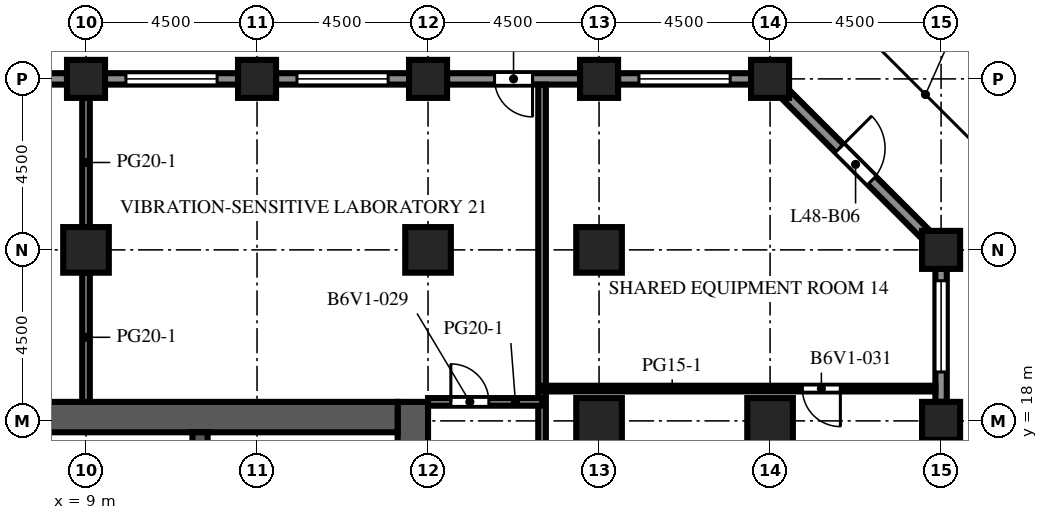
"""IFC4 building model, lengths in metres.
Left out: names, types, materials, properties, quantities, classifications, styles, units other than length and angle.
Written with IfcOpenShell. Run it as: python <this file> out.ifc"""

import sys

from ifc_helpers import new_model, si_unit, direction, frame, frame_2d, origin, origin_2d, place, context, subcontext, project, spatial, rectangle, extrude, element, fill, save


model = new_model("IFC4")
c1 = context("Model", 3, precision=1e-05, world=origin(), true_north=direction((0.0, 1.0)))
c2 = subcontext(c1, "Body", "Model", "MODEL_VIEW")
j1 = project(units=[si_unit("LENGTHUNIT", "METRE"), si_unit("PLANEANGLEUNIT", "RADIAN")], contexts=[c1])
p1 = place(None, origin())
s1 = spatial("IfcSite", under=j1, at=p1, CompositionType="ELEMENT")
p2 = place(p1, origin())
s2 = spatial("IfcBuilding", under=s1, at=p2, CompositionType="ELEMENT")
p3 = place(p2, frame((0.0, 0.0, 212.0)))
s3 = spatial("IfcBuildingStorey", under=s2, at=p3, CompositionType="ELEMENT", Elevation=212.0)
for number, where, z_axis, x_axis in (
    (1, (9.0, 27.0, 0.0), (0.0, 0.0, 1.0), (1.0, 0.0, 0.0)),
    (2, (13.5, 27.0, 0.0), (0.0, 0.0, 1.0), (1.0, 0.0, 0.0)),
    (3, (18.0, 27.0, 0.0), (0.0, 0.0, 1.0), (1.0, 0.0, 0.0)),
    (4, (22.5, 27.0, 0.0), (0.0, 0.0, 1.0), (1.0, 0.0, 0.0)),
    (5, (27.0, 27.0, 0.0), (0.0, 0.0, 1.0), (1.0, 0.0, 0.0)),
    (6, (31.5, 18.0, 0.0), (0.0, 0.0, 1.0), (1.0, 0.0, 0.0)),
    (7, (31.5, 22.5, 0.0), (0.0, 0.0, 1.0), (1.0, 0.0, 0.0)),
):
    element("IfcColumn", number, at=place(p3, frame(where, z_axis=z_axis, x_axis=x_axis)), inside=s3, PredefinedType="COLUMN", context=c2, shape_type="SweptSolid", body=[
        extrude(rectangle(XDim=1.0, YDim=1.0, at=origin_2d()), origin(), (0.0, 0.0, 1.0), 4.1),
    ])
for number, where, z_axis, x_axis in (
    (8, (9.0, 22.5, 0.0), (0.0, 0.0, 1.0), (1.0, 0.0, 0.0)),
    (9, (18.0, 22.5, 0.0), (0.0, 0.0, 1.0), (1.0, 0.0, 0.0)),
    (10, (22.5, 18.0, 0.0), (0.0, 0.0, 1.0), (1.0, 0.0, 0.0)),
    (11, (22.5, 22.5, 0.0), (0.0, 0.0, 1.0), (1.0, 0.0, 0.0)),
    (12, (27.0, 18.0, 0.0), (0.0, 0.0, 1.0), (1.0, 0.0, 0.0)),
):
    element("IfcColumn", number, at=place(p3, frame(where, z_axis=z_axis, x_axis=x_axis)), inside=s3, PredefinedType="COLUMN", context=c2, shape_type="SweptSolid", body=[
        extrude(rectangle(XDim=1.2, YDim=1.2, at=origin_2d()), origin(), (0.0, 0.0, 1.0), 4.1),
    ])
p4 = place(p3, frame((17.6, -9.0, 0.0), z_axis=(0.0, 0.0, 1.0), x_axis=(0.0, 1.0, 0.0)))
e13 = element("IfcWall", 13, at=p4, inside=s3, PredefinedType="SHEAR", context=c2, shape_type="SweptSolid", body=[
    extrude(rectangle(XDim=27.5, YDim=0.8, at=frame_2d((13.75, 0.0))), origin(), (0.0, 0.0, 1.0), 4.1),
])
p5 = place(p4, frame((12.55, 0.0, 0.0)))
e14 = element("IfcOpeningElement", 14, at=p5, cuts=e13, PredefinedType="OPENING", context=c2, shape_type="SweptSolid", body=[
    extrude(rectangle(XDim=2.4, YDim=2.4, at=frame_2d((1.2, 1.2))), frame((0.0, 0.41, 0.0), z_axis=(0.0, -1.0, 0.0), x_axis=(1.0, 0.0, 0.0)), (0.0, 0.0, 1.0), 0.82),
])
p6 = place(p4, frame((6.825, 0.0, 0.0)))
e15 = element("IfcOpeningElement", 15, at=p6, cuts=e13, PredefinedType="OPENING", context=c2, shape_type="SweptSolid", body=[
    extrude(rectangle(XDim=1.2, YDim=2.1, at=frame_2d((0.6, 1.05))), frame((0.0, 0.41, 0.0), z_axis=(0.0, -1.0, 0.0), x_axis=(1.0, 0.0, 0.0)), (0.0, 0.0, 1.0), 0.82),
])
p7 = place(p4, frame((19.475, 0.0, 0.0)))
e16 = element("IfcOpeningElement", 16, at=p7, cuts=e13, PredefinedType="OPENING", context=c2, shape_type="SweptSolid", body=[
    extrude(rectangle(XDim=1.2, YDim=2.1, at=frame_2d((0.6, 1.05))), frame((0.0, 0.41, 0.0), z_axis=(0.0, -1.0, 0.0), x_axis=(1.0, 0.0, 0.0)), (0.0, 0.0, 1.0), 0.82),
])
p8 = place(p3, frame((6.8, 18.1, 0.0), z_axis=(0.0, 0.0, 1.0), x_axis=(1.0, 0.0, 0.0)))
e17 = element("IfcWall", 17, at=p8, inside=s3, PredefinedType="SHEAR", context=c2, shape_type="SweptSolid", body=[
    extrude(rectangle(XDim=10.4, YDim=0.8, at=frame_2d((5.2, 0.0))), origin(), (0.0, 0.0, 1.0), 4.1),
])
p9 = place(p3, frame((12.0, 10.2, 0.0), z_axis=(0.0, 0.0, 1.0), x_axis=(0.0, 1.0, 0.0)))
e18 = element("IfcWall", 18, at=p9, inside=s3, PredefinedType="SHEAR", context=c2, shape_type="SweptSolid", body=[
    extrude(rectangle(XDim=7.5, YDim=0.4, at=frame_2d((3.75, 0.0))), origin(), (0.0, 0.0, 1.0), 4.1),
])
p10 = place(p3, frame((31.5, 22.0, 0.0), z_axis=(0.0, 0.0, 1.0), x_axis=(0.0, -1.0, 0.0)))
e19 = element("IfcWall", 19, at=p10, inside=s3, PredefinedType="SOLIDWALL", context=c2, shape_type="SweptSolid", body=[
    extrude(rectangle(XDim=3.5, YDim=0.3, at=frame_2d((1.75, 0.0))), origin(), (0.0, 0.0, 1.0), 2.85),
])
p11 = place(p10, frame((0.312, 0.0, 0.8)))
e20 = element("IfcOpeningElement", 20, at=p11, cuts=e19, PredefinedType="OPENING", context=c2, shape_type="SweptSolid", body=[
    extrude(rectangle(XDim=2.4, YDim=1.7, at=frame_2d((1.2, 0.85))), frame((0.0, 0.16, 0.0), z_axis=(0.0, -1.0, 0.0), x_axis=(1.0, 0.0, 0.0)), (0.0, 0.0, 1.0), 0.32),
])
p12 = place(p3, frame((27.394, 26.606, 0.0), z_axis=(0.0, 0.0, 1.0), x_axis=(0.707106781187, -0.707106781187, 0.0)))
e21 = element("IfcWall", 21, at=p12, inside=s3, PredefinedType="SOLIDWALL", context=c2, shape_type="SweptSolid", body=[
    extrude(rectangle(XDim=5.25, YDim=0.3, at=frame_2d((2.625, 0.0))), origin(), (0.0, 0.0, 1.0), 2.85),
])
p13 = place(p12, frame((2.025, 0.0, 0.0)))
e22 = element("IfcOpeningElement", 22, at=p13, cuts=e21, PredefinedType="OPENING", context=c2, shape_type="SweptSolid", body=[
    extrude(rectangle(XDim=1.2, YDim=2.2, at=frame_2d((0.6, 1.1))), frame((0.0, 0.16, 0.0), z_axis=(0.0, -1.0, 0.0), x_axis=(1.0, 0.0, 0.0)), (0.0, 0.0, 1.0), 0.32),
])
p14 = place(p3, frame((23.0, 27.0, 0.0), z_axis=(0.0, 0.0, 1.0), x_axis=(1.0, 0.0, 0.0)))
e23 = element("IfcWall", 23, at=p14, inside=s3, PredefinedType="SOLIDWALL", context=c2, shape_type="SweptSolid", body=[
    extrude(rectangle(XDim=3.5, YDim=0.3, at=frame_2d((1.75, 0.0))), origin(), (0.0, 0.0, 1.0), 2.85),
])
p15 = place(p14, frame((0.55, 0.0, 0.8)))
e24 = element("IfcOpeningElement", 24, at=p15, cuts=e23, PredefinedType="OPENING", context=c2, shape_type="SweptSolid", body=[
    extrude(rectangle(XDim=2.4, YDim=1.7, at=frame_2d((1.2, 0.85))), frame((0.0, 0.16, 0.0), z_axis=(0.0, -1.0, 0.0), x_axis=(1.0, 0.0, 0.0)), (0.0, 0.0, 1.0), 0.32),
])
p16 = place(p3, frame((18.5, 27.0, 0.0), z_axis=(0.0, 0.0, 1.0), x_axis=(1.0, 0.0, 0.0)))
e25 = element("IfcWall", 25, at=p16, inside=s3, PredefinedType="SOLIDWALL", context=c2, shape_type="SweptSolid", body=[
    extrude(rectangle(XDim=3.5, YDim=0.3, at=frame_2d((1.75, 0.0))), origin(), (0.0, 0.0, 1.0), 2.85),
])
p17 = place(p16, frame((1.25, 0.0, 0.0)))
e26 = element("IfcOpeningElement", 26, at=p17, cuts=e25, PredefinedType="OPENING", context=c2, shape_type="SweptSolid", body=[
    extrude(rectangle(XDim=1.0, YDim=2.2, at=frame_2d((0.5, 1.1))), frame((0.0, 0.16, 0.0), z_axis=(0.0, -1.0, 0.0), x_axis=(1.0, 0.0, 0.0)), (0.0, 0.0, 1.0), 0.32),
])
p18 = place(p3, frame((14.0, 27.0, 0.0), z_axis=(0.0, 0.0, 1.0), x_axis=(1.0, 0.0, 0.0)))
e27 = element("IfcWall", 27, at=p18, inside=s3, PredefinedType="SOLIDWALL", context=c2, shape_type="SweptSolid", body=[
    extrude(rectangle(XDim=3.5, YDim=0.3, at=frame_2d((1.75, 0.0))), origin(), (0.0, 0.0, 1.0), 2.85),
])
p19 = place(p18, frame((0.55, 0.0, 0.8)))
e28 = element("IfcOpeningElement", 28, at=p19, cuts=e27, PredefinedType="OPENING", context=c2, shape_type="SweptSolid", body=[
    extrude(rectangle(XDim=2.4, YDim=1.7, at=frame_2d((1.2, 0.85))), frame((0.0, 0.16, 0.0), z_axis=(0.0, -1.0, 0.0), x_axis=(1.0, 0.0, 0.0)), (0.0, 0.0, 1.0), 0.32),
])
p20 = place(p3, frame((9.5, 27.0, 0.0), z_axis=(0.0, 0.0, 1.0), x_axis=(1.0, 0.0, 0.0)))
e29 = element("IfcWall", 29, at=p20, inside=s3, PredefinedType="SOLIDWALL", context=c2, shape_type="SweptSolid", body=[
    extrude(rectangle(XDim=3.5, YDim=0.3, at=frame_2d((1.75, 0.0))), origin(), (0.0, 0.0, 1.0), 2.85),
])
p21 = place(p20, frame((0.55, 0.0, 0.8)))
e30 = element("IfcOpeningElement", 30, at=p21, cuts=e29, PredefinedType="OPENING", context=c2, shape_type="SweptSolid", body=[
    extrude(rectangle(XDim=2.4, YDim=1.7, at=frame_2d((1.2, 0.85))), frame((0.0, 0.16, 0.0), z_axis=(0.0, -1.0, 0.0), x_axis=(1.0, 0.0, 0.0)), (0.0, 0.0, 1.0), 0.32),
])
p22 = place(p3, frame((5.0, 27.0, 0.0), z_axis=(0.0, 0.0, 1.0), x_axis=(1.0, 0.0, 0.0)))
e31 = element("IfcWall", 31, at=p22, inside=s3, PredefinedType="SOLIDWALL", context=c2, shape_type="SweptSolid", body=[
    extrude(rectangle(XDim=3.5, YDim=0.3, at=frame_2d((1.75, 0.0))), origin(), (0.0, 0.0, 1.0), 2.85),
])
p23 = place(p22, frame((0.55, 0.0, 0.8)))
e32 = element("IfcOpeningElement", 32, at=p23, cuts=e31, PredefinedType="OPENING", context=c2, shape_type="SweptSolid", body=[
    extrude(rectangle(XDim=2.4, YDim=1.7, at=frame_2d((1.2, 0.85))), frame((0.0, 0.16, 0.0), z_axis=(0.0, -1.0, 0.0), x_axis=(1.0, 0.0, 0.0)), (0.0, 0.0, 1.0), 0.32),
])
p24 = place(p3, frame((8.2, 14.85, 0.0), z_axis=(0.0, 0.0, 1.0), x_axis=(0.0, 1.0, 0.0)))
e33 = element("IfcWall", 33, at=p24, inside=s3, PredefinedType="PARTITIONING", context=c2, shape_type="SweptSolid", body=[
    extrude(rectangle(XDim=2.85, YDim=0.1, at=frame_2d((1.425, 0.0))), origin(), (0.0, 0.0, 1.0), 3.65),
])
p25 = place(p24, frame((0.925, 0.0, 0.0)))
e34 = element("IfcOpeningElement", 34, at=p25, cuts=e33, PredefinedType="OPENING", context=c2, shape_type="SweptSolid", body=[
    extrude(rectangle(XDim=1.0, YDim=2.1, at=frame_2d((0.5, 1.05))), frame((0.0, 0.06, 0.0), z_axis=(0.0, -1.0, 0.0), x_axis=(1.0, 0.0, 0.0)), (0.0, 0.0, 1.0), 0.12),
])
for number, where, z_axis, x_axis in (
    (35, (9.0, 18.5, 0.0), (0.0, 0.0, 1.0), (0.0, 1.0, 0.0)),
    (36, (9.0, 23.1, 0.0), (0.0, 0.0, 1.0), (0.0, 1.0, 0.0)),
):
    element("IfcWall", number, at=place(p3, frame(where, z_axis=z_axis, x_axis=x_axis)), inside=s3, PredefinedType="PARTITIONING", context=c2, shape_type="SweptSolid", body=[
        extrude(rectangle(XDim=3.4, YDim=0.2, at=frame_2d((1.7, 0.0))), origin(), (0.0, 0.0, 1.0), 3.65),
    ])
p26 = place(p3, frame((21.0, 6.25, 0.0), z_axis=(0.0, 0.0, 1.0), x_axis=(0.0, 1.0, 0.0)))
e37 = element("IfcWall", 37, at=p26, inside=s3, PredefinedType="PARTITIONING", context=c2, shape_type="SweptSolid", body=[
    extrude(rectangle(XDim=20.6, YDim=0.2, at=frame_2d((10.3, 0.0))), origin(), (0.0, 0.0, 1.0), 3.65),
])
p27 = place(p3, frame((18.0, 18.5, 0.0), z_axis=(0.0, 0.0, 1.0), x_axis=(1.0, 0.0, 0.0)))
e38 = element("IfcWall", 38, at=p27, inside=s3, PredefinedType="PARTITIONING", context=c2, shape_type="SweptSolid", body=[
    extrude(rectangle(XDim=3.0, YDim=0.2, at=frame_2d((1.5, 0.0))), origin(), (0.0, 0.0, 1.0), 3.65),
])
p28 = place(p27, frame((0.6, 0.0, 0.0)))
e39 = element("IfcOpeningElement", 39, at=p28, cuts=e38, PredefinedType="OPENING", context=c2, shape_type="SweptSolid", body=[
    extrude(rectangle(XDim=1.0, YDim=2.1, at=frame_2d((0.5, 1.05))), frame((0.0, 0.11, 0.0), z_axis=(0.0, -1.0, 0.0), x_axis=(1.0, 0.0, 0.0)), (0.0, 0.0, 1.0), 0.22),
])
p29 = place(p3, frame((21.0, 18.85, 0.0), z_axis=(0.0, 0.0, 1.0), x_axis=(1.0, 0.0, 0.0)))
e40 = element("IfcWall", 40, at=p29, inside=s3, PredefinedType="PARTITIONING", context=c2, shape_type="SweptSolid", body=[
    extrude(rectangle(XDim=10.35, YDim=0.15, at=frame_2d((5.175, 0.0))), origin(), (0.0, 0.0, 1.0), 3.65),
])
p30 = place(p29, frame((6.85, 0.0, 0.0)))
e41 = element("IfcOpeningElement", 41, at=p30, cuts=e40, PredefinedType="OPENING", context=c2, shape_type="SweptSolid", body=[
    extrude(rectangle(XDim=1.0, YDim=2.1, at=frame_2d((0.5, 1.05))), frame((0.0, 0.085, 0.0), z_axis=(0.0, -1.0, 0.0), x_axis=(1.0, 0.0, 0.0)), (0.0, 0.0, 1.0), 0.17),
])
p31 = place(p11, origin())
e42 = element("IfcWindow", 42, at=p31, inside=s3, PartitioningType="SINGLE_PANEL", PredefinedType="WINDOW", context=c2, shape_type="SweptSolid", body=[
    extrude(rectangle(XDim=2.4, YDim=1.7, at=frame_2d((1.2, 0.85))), frame((0.0, 0.03, 0.0), z_axis=(0.0, -1.0, 0.0), x_axis=(1.0, 0.0, 0.0)), (0.0, 0.0, 1.0), 0.06),
])
fill(e20, e42)
p32 = place(p13, origin())
e43 = element("IfcDoor", 43, at=p32, inside=s3, OperationType="SINGLE_SWING_LEFT", PredefinedType="DOOR", context=c2, shape_type="SweptSolid", body=[
    extrude(rectangle(XDim=1.2, YDim=2.2, at=frame_2d((0.6, 1.1))), frame((0.0, 0.025, 0.0), z_axis=(0.0, -1.0, 0.0), x_axis=(1.0, 0.0, 0.0)), (0.0, 0.0, 1.0), 0.05),
])
fill(e22, e43)
p33 = place(p15, origin())
e44 = element("IfcWindow", 44, at=p33, inside=s3, PartitioningType="SINGLE_PANEL", PredefinedType="WINDOW", context=c2, shape_type="SweptSolid", body=[
    extrude(rectangle(XDim=2.4, YDim=1.7, at=frame_2d((1.2, 0.85))), frame((0.0, 0.03, 0.0), z_axis=(0.0, -1.0, 0.0), x_axis=(1.0, 0.0, 0.0)), (0.0, 0.0, 1.0), 0.06),
])
fill(e24, e44)
p34 = place(p17, origin())
e45 = element("IfcDoor", 45, at=p34, inside=s3, OperationType="SINGLE_SWING_RIGHT", PredefinedType="DOOR", context=c2, shape_type="SweptSolid", body=[
    extrude(rectangle(XDim=1.0, YDim=2.2, at=frame_2d((0.5, 1.1))), frame((0.0, 0.025, 0.0), z_axis=(0.0, -1.0, 0.0), x_axis=(1.0, 0.0, 0.0)), (0.0, 0.0, 1.0), 0.05),
])
fill(e26, e45)
p35 = place(p19, origin())
e46 = element("IfcWindow", 46, at=p35, inside=s3, PartitioningType="SINGLE_PANEL", PredefinedType="WINDOW", context=c2, shape_type="SweptSolid", body=[
    extrude(rectangle(XDim=2.4, YDim=1.7, at=frame_2d((1.2, 0.85))), frame((0.0, 0.03, 0.0), z_axis=(0.0, -1.0, 0.0), x_axis=(1.0, 0.0, 0.0)), (0.0, 0.0, 1.0), 0.06),
])
fill(e28, e46)
p36 = place(p21, origin())
e47 = element("IfcWindow", 47, at=p36, inside=s3, PartitioningType="SINGLE_PANEL", PredefinedType="WINDOW", context=c2, shape_type="SweptSolid", body=[
    extrude(rectangle(XDim=2.4, YDim=1.7, at=frame_2d((1.2, 0.85))), frame((0.0, 0.03, 0.0), z_axis=(0.0, -1.0, 0.0), x_axis=(1.0, 0.0, 0.0)), (0.0, 0.0, 1.0), 0.06),
])
fill(e30, e47)
p37 = place(p28, origin())
e48 = element("IfcDoor", 48, at=p37, inside=s3, OperationType="SINGLE_SWING_LEFT", PredefinedType="DOOR", context=c2, shape_type="SweptSolid", body=[
    extrude(rectangle(XDim=1.0, YDim=2.1, at=frame_2d((0.5, 1.05))), frame((0.0, 0.025, 0.0), z_axis=(0.0, -1.0, 0.0), x_axis=(1.0, 0.0, 0.0)), (0.0, 0.0, 1.0), 0.05),
])
fill(e39, e48)
p38 = place(p30, origin())
e49 = element("IfcDoor", 49, at=p38, inside=s3, OperationType="SINGLE_SWING_RIGHT", PredefinedType="DOOR", context=c2, shape_type="SweptSolid", body=[
    extrude(rectangle(XDim=1.0, YDim=2.1, at=frame_2d((0.5, 1.05))), frame((0.0, 0.025, 0.0), z_axis=(0.0, -1.0, 0.0), x_axis=(1.0, 0.0, 0.0)), (0.0, 0.0, 1.0), 0.05),
])
fill(e41, e49)
save(model, sys.argv[1])
